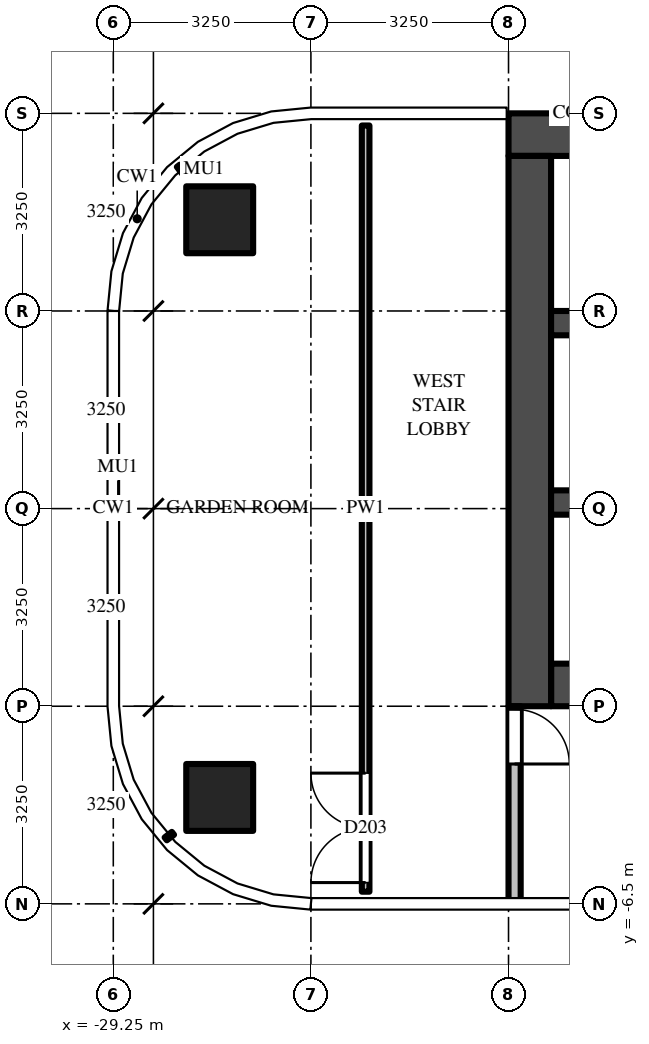
"""IFC4 building model, lengths in metres.
Left out: names, types, materials, properties, quantities, classifications, styles, units other than length and angle.
Written with IfcOpenShell. Run it as: python <this file> out.ifc"""

import sys

from ifc_helpers import new_model, si_unit, direction, frame, frame_2d, origin, origin_2d, place, context, subcontext, project, spatial, rectangle, extrude, source, transform, mapped, element, fill, save


model = new_model("IFC4")
c1 = context("Model", 3, precision=1e-05, world=origin(), true_north=direction((0.0, 1.0)))
c2 = subcontext(c1, "Body", "Model", "MODEL_VIEW")
j1 = project(units=[si_unit("LENGTHUNIT", "METRE"), si_unit("PLANEANGLEUNIT", "RADIAN")], contexts=[c1])
p1 = place(None, origin())
s1 = spatial("IfcSite", under=j1, at=p1, CompositionType="ELEMENT")
p2 = place(p1, origin())
s2 = spatial("IfcBuilding", under=s1, at=p2, CompositionType="ELEMENT")
p3 = place(p2, frame((0.0, 0.0, 244.1)))
s3 = spatial("IfcBuildingStorey", under=s2, at=p3, CompositionType="ELEMENT", Elevation=244.1)
m1 = source(origin(), c2, "Body", "SweptSolid", [
    extrude(rectangle(XDim=1.1, YDim=1.1, at=origin_2d()), origin(), (0.0, 0.0, 1.0), 3.9),
])
for number, where, z_axis, x_axis in (
    (1, (-27.5, -4.75, 0.0), (0.0, 0.0, 1.0), (1.0, 0.0, 0.0)),
    (2, (-27.5, 4.75, 0.0), (0.0, 0.0, 1.0), (1.0, 0.0, 0.0)),
):
    element("IfcColumn", number, at=place(p3, frame(where, z_axis=z_axis, x_axis=x_axis)), inside=s3, PredefinedType="COLUMN", context=c2, shape_type="MappedRepresentation", body=[
        mapped(m1, transform((0.0, 0.0, 0.0))),
    ])
m2 = source(origin(), c2, "Body", "SweptSolid", [
    extrude(rectangle(XDim=16.6, YDim=0.7, at=frame_2d((8.3, 0.0))), origin(), (0.0, 0.0, 1.0), 3.7),
])
p4 = place(p3, frame((-6.15, 6.15, 0.0), z_axis=(0.0, 0.0, 1.0), x_axis=(-1.0, 0.0, 0.0)))
e3 = element("IfcWall", 3, at=p4, inside=s3, PredefinedType="SHEAR", context=c2, shape_type="MappedRepresentation", body=[
    mapped(m2, transform((0.0, 0.0, 0.0))),
])
m3 = source(origin(), c2, "Body", "SweptSolid", [
    extrude(rectangle(XDim=14.85, YDim=0.7, at=frame_2d((7.425, 0.0))), origin(), (0.0, 0.0, 1.0), 3.7),
])
p5 = place(p3, frame((-7.2, -2.9, 0.0), z_axis=(0.0, 0.0, 1.0), x_axis=(-1.0, 0.0, 0.0)))
e4 = element("IfcWall", 4, at=p5, inside=s3, PredefinedType="SHEAR", context=c2, shape_type="MappedRepresentation", body=[
    mapped(m3, transform((0.0, 0.0, 0.0))),
])
m4 = source(origin(), c2, "Body", "SweptSolid", [
    extrude(rectangle(XDim=1.1, YDim=2.1, at=frame_2d((0.55, 1.05))), frame((0.0, 0.36, 0.0), z_axis=(0.0, -1.0, 0.0), x_axis=(1.0, 0.0, 0.0)), (0.0, 0.0, 1.0), 0.72),
])
p6 = place(p5, frame((0.55, 0.0, 0.0)))
e5 = element("IfcOpeningElement", 5, at=p6, cuts=e4, PredefinedType="OPENING", context=c2, shape_type="MappedRepresentation", body=[
    mapped(m4, transform((0.0, 0.0, 0.0))),
])
p7 = place(p5, frame((3.15, 0.0, 0.0)))
e6 = element("IfcOpeningElement", 6, at=p7, cuts=e4, PredefinedType="OPENING", context=c2, shape_type="MappedRepresentation", body=[
    mapped(m4, transform((0.0, 0.0, 0.0))),
])
m5 = source(origin(), c2, "Body", "SweptSolid", [
    extrude(rectangle(XDim=1.2, YDim=2.1, at=frame_2d((0.6, 1.05))), frame((0.0, 0.36, 0.0), z_axis=(0.0, -1.0, 0.0), x_axis=(1.0, 0.0, 0.0)), (0.0, 0.0, 1.0), 0.72),
])
p8 = place(p5, frame((5.7, 0.0, 0.0)))
e7 = element("IfcOpeningElement", 7, at=p8, cuts=e4, PredefinedType="OPENING", context=c2, shape_type="MappedRepresentation", body=[
    mapped(m5, transform((0.0, 0.0, 0.0))),
])
m6 = source(origin(), c2, "Body", "SweptSolid", [
    extrude(rectangle(XDim=1.3, YDim=2.1, at=frame_2d((0.65, 1.05))), frame((0.0, 0.36, 0.0), z_axis=(0.0, -1.0, 0.0), x_axis=(1.0, 0.0, 0.0)), (0.0, 0.0, 1.0), 0.72),
])
p9 = place(p5, frame((12.2, 0.0, 0.0)))
e8 = element("IfcOpeningElement", 8, at=p9, cuts=e4, PredefinedType="OPENING", context=c2, shape_type="MappedRepresentation", body=[
    mapped(m6, transform((0.0, 0.0, 0.0))),
])
p10 = place(p5, frame((9.85, 0.0, 0.0)))
e9 = element("IfcOpeningElement", 9, at=p10, cuts=e4, PredefinedType="OPENING", context=c2, shape_type="MappedRepresentation", body=[
    mapped(m5, transform((0.0, 0.0, 0.0))),
])
m7 = source(origin(), c2, "Body", "SweptSolid", [
    extrude(rectangle(XDim=1.0, YDim=2.1, at=frame_2d((0.5, 1.05))), frame((0.0, 0.36, 0.0), z_axis=(0.0, -1.0, 0.0), x_axis=(1.0, 0.0, 0.0)), (0.0, 0.0, 1.0), 0.72),
])
p11 = place(p5, frame((7.9, 0.0, 0.0)))
e10 = element("IfcOpeningElement", 10, at=p11, cuts=e4, PredefinedType="OPENING", context=c2, shape_type="MappedRepresentation", body=[
    mapped(m7, transform((0.0, 0.0, 0.0))),
])
m8 = source(origin(), c2, "Body", "SweptSolid", [
    extrude(rectangle(XDim=9.05, YDim=0.7, at=frame_2d((4.525, 0.0))), origin(), (0.0, 0.0, 1.0), 3.7),
])
p12 = place(p3, frame((-22.4, 5.8, 0.0), z_axis=(0.0, 0.0, 1.0), x_axis=(0.0, -1.0, 0.0)))
e11 = element("IfcWall", 11, at=p12, inside=s3, PredefinedType="SHEAR", context=c2, shape_type="MappedRepresentation", body=[
    mapped(m8, transform((0.0, 0.0, 0.0))),
])
m9 = source(origin(), c2, "Body", "SweptSolid", [
    extrude(rectangle(XDim=14.85, YDim=0.4, at=frame_2d((7.425, 0.0))), origin(), (0.0, 0.0, 1.0), 3.7),
])
p13 = place(p3, frame((-7.2, 0.1, 0.0), z_axis=(0.0, 0.0, 1.0), x_axis=(-1.0, 0.0, 0.0)))
e12 = element("IfcWall", 12, at=p13, inside=s3, PredefinedType="SHEAR", context=c2, shape_type="MappedRepresentation", body=[
    mapped(m9, transform((0.0, 0.0, 0.0))),
])
m10 = source(origin(), c2, "Body", "SweptSolid", [
    extrude(rectangle(XDim=1.0, YDim=2.1, at=frame_2d((0.5, 1.05))), frame((0.0, 0.21, 0.0), z_axis=(0.0, -1.0, 0.0), x_axis=(1.0, 0.0, 0.0)), (0.0, 0.0, 1.0), 0.42),
])
p14 = place(p13, frame((7.9, 0.0, 0.0)))
e13 = element("IfcOpeningElement", 13, at=p14, cuts=e12, PredefinedType="OPENING", context=c2, shape_type="MappedRepresentation", body=[
    mapped(m10, transform((0.0, 0.0, 0.0))),
])
m11 = source(origin(), c2, "Body", "SweptSolid", [
    extrude(rectangle(XDim=5.7, YDim=0.4, at=frame_2d((2.85, 0.0))), origin(), (0.0, 0.0, 1.0), 3.7),
])
p15 = place(p3, frame((-16.35, 3.05, 0.0), z_axis=(0.0, 0.0, 1.0), x_axis=(-1.0, 0.0, 0.0)))
e14 = element("IfcWall", 14, at=p15, inside=s3, PredefinedType="SHEAR", context=c2, shape_type="MappedRepresentation", body=[
    mapped(m11, transform((0.0, 0.0, 0.0))),
])
m12 = source(origin(), c2, "Body", "SweptSolid", [
    extrude(rectangle(XDim=3.25, YDim=0.2, at=frame_2d((1.625, 0.0))), origin(), (0.0, 0.0, 1.0), 3.7),
])
p16 = place(p3, frame((-22.65, -3.25, 0.0), z_axis=(0.0, 0.0, 1.0), x_axis=(0.0, -1.0, 0.0)))
e15 = element("IfcWall", 15, at=p16, inside=s3, PredefinedType="PARTITIONING", context=c2, shape_type="MappedRepresentation", body=[
    mapped(m12, transform((0.0, 0.0, 0.0))),
])
m13 = source(origin(), c2, "Body", "SweptSolid", [
    extrude(rectangle(XDim=0.9, YDim=2.1, at=frame_2d((0.45, 1.05))), frame((0.0, 0.11, 0.0), z_axis=(0.0, -1.0, 0.0), x_axis=(1.0, 0.0, 0.0)), (0.0, 0.0, 1.0), 0.22),
])
p17 = place(p16, frame((0.05, 0.0, 0.0)))
e16 = element("IfcOpeningElement", 16, at=p17, cuts=e15, PredefinedType="OPENING", context=c2, shape_type="MappedRepresentation", body=[
    mapped(m13, transform((0.0, 0.0, 0.0))),
])
m14 = source(origin(), c2, "Body", "SweptSolid", [
    extrude(rectangle(XDim=12.6, YDim=0.125, at=frame_2d((6.3, 0.0))), origin(), (0.0, 0.0, 1.0), 2.78),
])
p18 = place(p3, frame((-25.1, -6.3, 0.0), z_axis=(0.0, 0.0, 1.0), x_axis=(0.0, 1.0, 0.0)))
e17 = element("IfcWall", 17, at=p18, inside=s3, PredefinedType="PARTITIONING", context=c2, shape_type="MappedRepresentation", body=[
    mapped(m14, transform((0.0, 0.0, 0.0))),
])
m15 = source(origin(), c2, "Body", "SweptSolid", [
    extrude(rectangle(XDim=1.8, YDim=2.1, at=frame_2d((0.9, 1.05))), frame((0.0, 0.073, 0.0), z_axis=(0.0, -1.0, 0.0), x_axis=(1.0, 0.0, 0.0)), (0.0, 0.0, 1.0), 0.145),
])
p19 = place(p18, frame((0.15, 0.0, 0.0)))
e18 = element("IfcOpeningElement", 18, at=p19, cuts=e17, PredefinedType="OPENING", context=c2, shape_type="MappedRepresentation", body=[
    mapped(m15, transform((0.0, 0.0, 0.0))),
])
m16 = source(origin(), c2, "Body", "SweptSolid", [
    extrude(rectangle(XDim=0.9, YDim=2.1, at=frame_2d((0.45, 1.05))), frame((0.0, 0.025, 0.0), z_axis=(0.0, -1.0, 0.0), x_axis=(1.0, 0.0, 0.0)), (0.0, 0.0, 1.0), 0.05),
])
p20 = place(p17, origin())
e19 = element("IfcDoor", 19, at=p20, inside=s3, OperationType="SINGLE_SWING_RIGHT", PredefinedType="DOOR", context=c2, shape_type="MappedRepresentation", body=[
    mapped(m16, transform((0.0, 0.0, 0.0))),
])
fill(e16, e19)
m17 = source(origin(), c2, "Body", "SweptSolid", [
    extrude(rectangle(XDim=1.8, YDim=2.1, at=frame_2d((0.9, 1.05))), frame((0.0, 0.025, 0.0), z_axis=(0.0, -1.0, 0.0), x_axis=(1.0, 0.0, 0.0)), (0.0, 0.0, 1.0), 0.05),
])
p21 = place(p19, origin())
e20 = element("IfcDoor", 20, at=p21, inside=s3, OperationType="DOUBLE_DOOR_SINGLE_SWING", PredefinedType="DOOR", context=c2, shape_type="MappedRepresentation", body=[
    mapped(m17, transform((0.0, 0.0, 0.0))),
])
fill(e18, e20)
save(model, sys.argv[1])
